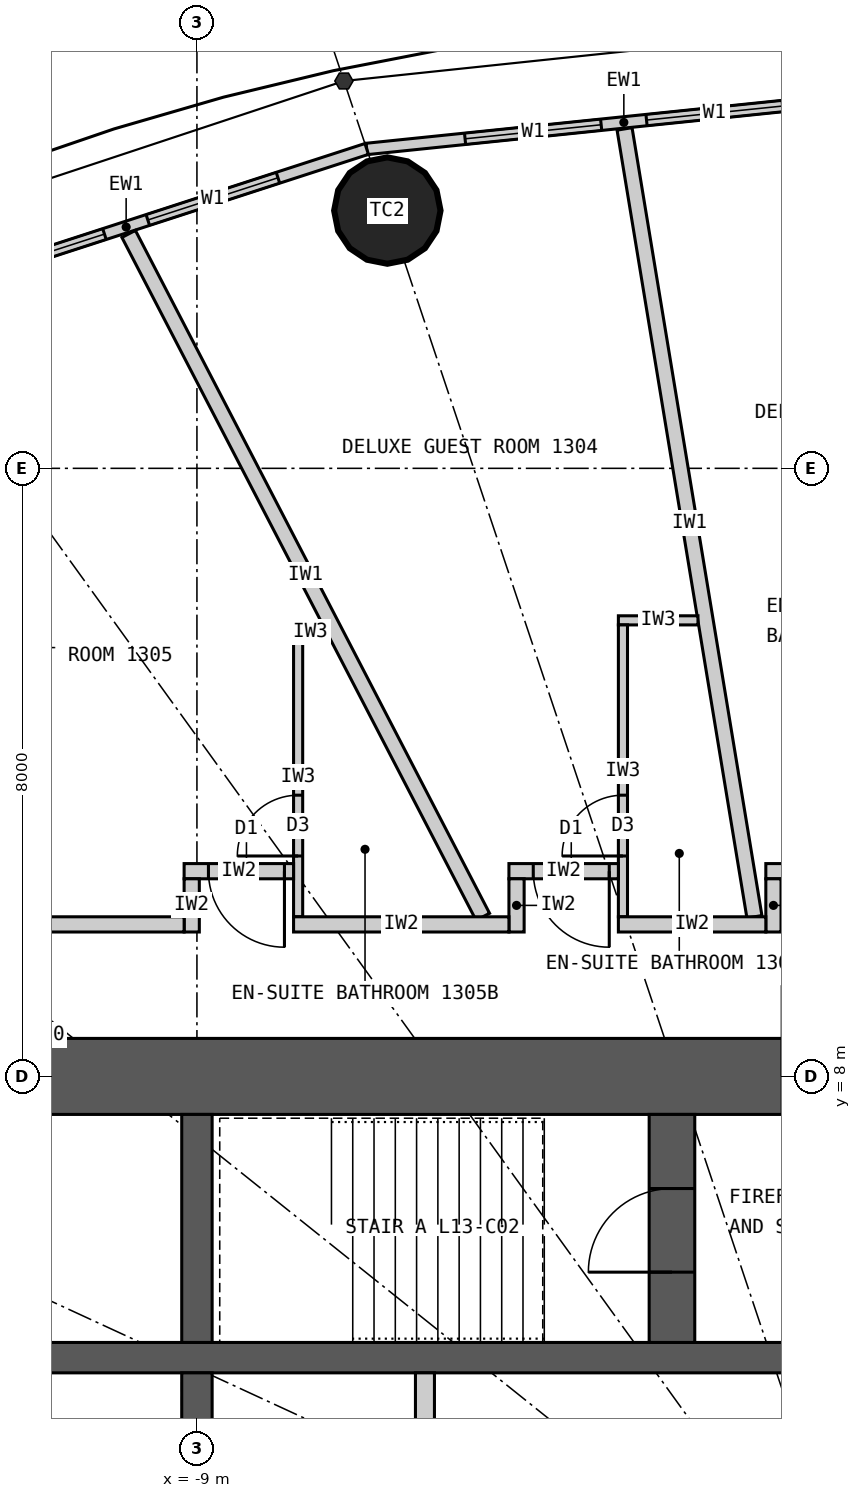
"""IFC4 building model, lengths in metres.
Left out: names, types, materials, properties, quantities, classifications, styles, units other than length and angle.
Written with IfcOpenShell. Run it as: python <this file> out.ifc"""

import sys

from ifc_helpers import new_model, si_unit, direction, frame, frame_2d, origin, origin_2d, place, context, subcontext, project, spatial, rectangle, circle, extrude, element, fill, save


model = new_model("IFC4")
c1 = context("Model", 3, precision=1e-05, world=origin(), true_north=direction((0.0, 1.0)))
c2 = subcontext(c1, "Body", "Model", "MODEL_VIEW")
j1 = project(units=[si_unit("LENGTHUNIT", "METRE"), si_unit("PLANEANGLEUNIT", "RADIAN")], contexts=[c1])
p1 = place(None, origin())
s1 = spatial("IfcSite", under=j1, at=p1, CompositionType="ELEMENT")
p2 = place(p1, origin())
s2 = spatial("IfcBuilding", under=s1, at=p2, CompositionType="ELEMENT")
p3 = place(p2, frame((0.0, 0.0, 57.3)))
s3 = spatial("IfcBuildingStorey", under=s2, at=p3, CompositionType="ELEMENT", Elevation=57.3)
p4 = place(p3, frame((-6.495, 19.391, 0.0), z_axis=(0.0, 0.0, 1.0), x_axis=(1.0, 0.0, 0.0)))
e1 = element("IfcColumn", 1, at=p4, inside=s3, PredefinedType="COLUMN", context=c2, shape_type="SweptSolid", body=[
    extrude(circle(Radius=0.7, at=origin_2d()), origin(), (0.0, 0.0, 1.0), 3.3),
])
p5 = place(p3, frame((-12.5, 8.0, 0.0), z_axis=(0.0, 0.0, 1.0), x_axis=(1.0, 0.0, 0.0)))
e2 = element("IfcWall", 2, at=p5, inside=s3, PredefinedType="SHEAR", context=c2, shape_type="SweptSolid", body=[
    extrude(rectangle(XDim=25.0, YDim=1.0, at=frame_2d((12.5, 0.0))), origin(), (0.0, 0.0, 1.0), 3.3),
])
p6 = place(p5, frame((11.2, 0.0, 0.0)))
e3 = element("IfcOpeningElement", 3, at=p6, cuts=e2, PredefinedType="OPENING", context=c2, shape_type="SweptSolid", body=[
    extrude(rectangle(XDim=1.2, YDim=2.2, at=frame_2d((0.6, 1.1))), frame((0.0, 0.51, 0.0), z_axis=(0.0, -1.0, 0.0), x_axis=(1.0, 0.0, 0.0)), (0.0, 0.0, 1.0), 1.02),
])
p7 = place(p5, frame((18.8, 0.0, 0.0)))
e4 = element("IfcOpeningElement", 4, at=p7, cuts=e2, PredefinedType="OPENING", context=c2, shape_type="SweptSolid", body=[
    extrude(rectangle(XDim=0.9, YDim=2.2, at=frame_2d((0.45, 1.1))), frame((0.0, 0.51, 0.0), z_axis=(0.0, -1.0, 0.0), x_axis=(1.0, 0.0, 0.0)), (0.0, 0.0, 1.0), 1.02),
])
p8 = place(p3, frame((-11.5, 4.3, 0.0), z_axis=(0.0, 0.0, 1.0), x_axis=(1.0, 0.0, 0.0)))
e5 = element("IfcWall", 5, at=p8, inside=s3, PredefinedType="SHEAR", context=c2, shape_type="SweptSolid", body=[
    extrude(rectangle(XDim=23.0, YDim=0.4, at=frame_2d((11.5, 0.0))), origin(), (0.0, 0.0, 1.0), 3.3),
])
p9 = place(p3, frame((-9.0, 4.5, 0.0), z_axis=(0.0, 0.0, 1.0), x_axis=(0.0, 1.0, 0.0)))
e6 = element("IfcWall", 6, at=p9, inside=s3, PredefinedType="SHEAR", context=c2, shape_type="SweptSolid", body=[
    extrude(rectangle(XDim=3.0, YDim=0.4, at=frame_2d((1.5, 0.0))), origin(), (0.0, 0.0, 1.0), 3.3),
])
p10 = place(p3, frame((-9.0, 1.75, 0.0), z_axis=(0.0, 0.0, 1.0), x_axis=(0.0, 1.0, 0.0)))
e7 = element("IfcWall", 7, at=p10, inside=s3, PredefinedType="SHEAR", context=c2, shape_type="SweptSolid", body=[
    extrude(rectangle(XDim=2.35, YDim=0.4, at=frame_2d((1.175, 0.0))), origin(), (0.0, 0.0, 1.0), 3.3),
])
p11 = place(p3, frame((-2.75, 4.5, 0.0), z_axis=(0.0, 0.0, 1.0), x_axis=(0.0, 1.0, 0.0)))
e8 = element("IfcWall", 8, at=p11, inside=s3, PredefinedType="SHEAR", context=c2, shape_type="SweptSolid", body=[
    extrude(rectangle(XDim=3.0, YDim=0.6, at=frame_2d((1.5, 0.0))), origin(), (0.0, 0.0, 1.0), 3.3),
])
p12 = place(p11, frame((0.925, 0.0, 0.0)))
e9 = element("IfcOpeningElement", 9, at=p12, cuts=e8, PredefinedType="OPENING", context=c2, shape_type="SweptSolid", body=[
    extrude(rectangle(XDim=1.1, YDim=2.2, at=frame_2d((0.55, 1.1))), frame((0.0, 0.31, 0.0), z_axis=(0.0, -1.0, 0.0), x_axis=(1.0, 0.0, 0.0)), (0.0, 0.0, 1.0), 0.62),
])
p13 = place(p3, frame((-6.0, 1.75, 0.0), z_axis=(0.0, 0.0, 1.0), x_axis=(0.0, 1.0, 0.0)))
e10 = element("IfcWall", 10, at=p13, inside=s3, PredefinedType="PARTITIONING", context=c2, shape_type="SweptSolid", body=[
    extrude(rectangle(XDim=2.35, YDim=0.25, at=frame_2d((1.175, 0.0))), origin(), (0.0, 0.0, 1.0), 3.3),
])
p14 = place(p3, frame((0.0, 20.9, 0.0), z_axis=(0.0, 0.0, 1.0), x_axis=(-0.994721394369, -0.102612609291, 0.0)))
e11 = element("IfcWall", 11, at=p14, inside=s3, PredefinedType="ELEMENTEDWALL", context=c2, shape_type="SweptSolid", body=[
    extrude(rectangle(XDim=6.802, YDim=0.15, at=frame_2d((3.401, 0.0))), origin(), (0.0, 0.0, 1.0), 3.12),
])
p15 = place(p14, frame((1.301, 0.0, 0.9)))
e12 = element("IfcOpeningElement", 12, at=p15, cuts=e11, PredefinedType="OPENING", context=c2, shape_type="SweptSolid", body=[
    extrude(rectangle(XDim=1.8, YDim=1.9, at=frame_2d((0.9, 0.95))), frame((0.0, 0.085, 0.0), z_axis=(0.0, -1.0, 0.0), x_axis=(1.0, 0.0, 0.0)), (0.0, 0.0, 1.0), 0.17),
])
p16 = place(p14, frame((3.701, 0.0, 0.9)))
e13 = element("IfcOpeningElement", 13, at=p16, cuts=e11, PredefinedType="OPENING", context=c2, shape_type="SweptSolid", body=[
    extrude(rectangle(XDim=1.8, YDim=1.9, at=frame_2d((0.9, 0.95))), frame((0.0, 0.085, 0.0), z_axis=(0.0, -1.0, 0.0), x_axis=(1.0, 0.0, 0.0)), (0.0, 0.0, 1.0), 0.17),
])
p17 = place(p3, frame((-6.766, 20.202, 0.0), z_axis=(0.0, 0.0, 1.0), x_axis=(-0.951137534625, -0.308767534285, 0.0)))
e14 = element("IfcWall", 14, at=p17, inside=s3, PredefinedType="ELEMENTEDWALL", context=c2, shape_type="SweptSolid", body=[
    extrude(rectangle(XDim=6.655, YDim=0.15, at=frame_2d((3.328, 0.0))), origin(), (0.0, 0.0, 1.0), 3.12),
])
p18 = place(p17, frame((1.228, 0.0, 0.9)))
e15 = element("IfcOpeningElement", 15, at=p18, cuts=e14, PredefinedType="OPENING", context=c2, shape_type="SweptSolid", body=[
    extrude(rectangle(XDim=1.8, YDim=1.9, at=frame_2d((0.9, 0.95))), frame((0.0, 0.085, 0.0), z_axis=(0.0, -1.0, 0.0), x_axis=(1.0, 0.0, 0.0)), (0.0, 0.0, 1.0), 0.17),
])
p19 = place(p17, frame((3.628, 0.0, 0.9)))
e16 = element("IfcOpeningElement", 16, at=p19, cuts=e14, PredefinedType="OPENING", context=c2, shape_type="SweptSolid", body=[
    extrude(rectangle(XDim=1.8, YDim=1.9, at=frame_2d((0.9, 0.95))), frame((0.0, 0.085, 0.0), z_axis=(0.0, -1.0, 0.0), x_axis=(1.0, 0.0, 0.0)), (0.0, 0.0, 1.0), 0.17),
])
p20 = place(p3, frame((-1.665, 10.1, 0.0), z_axis=(0.0, 0.0, 1.0), x_axis=(-0.162657606458, 0.986682574621, 0.0)))
e17 = element("IfcWall", 17, at=p20, inside=s3, PredefinedType="PARTITIONING", context=c2, shape_type="SweptSolid", body=[
    extrude(rectangle(XDim=10.505, YDim=0.2, at=frame_2d((5.252, 0.0))), origin(), (0.0, 0.0, 1.0), 3.12),
])
p21 = place(p3, frame((-5.239, 10.1, 0.0), z_axis=(0.0, 0.0, 1.0), x_axis=(-0.460422783389, 0.887699758103, 0.0)))
e18 = element("IfcWall", 18, at=p21, inside=s3, PredefinedType="PARTITIONING", context=c2, shape_type="SweptSolid", body=[
    extrude(rectangle(XDim=10.12, YDim=0.2, at=frame_2d((5.06, 0.0))), origin(), (0.0, 0.0, 1.0), 3.12),
])
p22 = place(p3, frame((-2.408, 14.0, 0.0), z_axis=(0.0, 0.0, 1.0), x_axis=(-1.0, 0.0, 0.0)))
e19 = element("IfcWall", 19, at=p22, inside=s3, PredefinedType="PARTITIONING", context=c2, shape_type="SweptSolid", body=[
    extrude(rectangle(XDim=1.047, YDim=0.12, at=frame_2d((0.523, 0.0))), origin(), (0.0, 0.0, 1.0), 3.12),
])
p23 = place(p3, frame((-3.395, 10.1, 0.0), z_axis=(0.0, 0.0, 1.0), x_axis=(0.0, 1.0, 0.0)))
e20 = element("IfcWall", 20, at=p23, inside=s3, PredefinedType="PARTITIONING", context=c2, shape_type="SweptSolid", body=[
    extrude(rectangle(XDim=3.84, YDim=0.12, at=frame_2d((1.92, 0.0))), origin(), (0.0, 0.0, 1.0), 3.12),
])
p24 = place(p23, frame((0.8, 0.0, 0.0)))
e21 = element("IfcOpeningElement", 21, at=p24, cuts=e20, PredefinedType="OPENING", context=c2, shape_type="SweptSolid", body=[
    extrude(rectangle(XDim=0.8, YDim=2.1, at=frame_2d((0.4, 1.05))), frame((0.0, 0.07, 0.0), z_axis=(0.0, -1.0, 0.0), x_axis=(1.0, 0.0, 0.0)), (0.0, 0.0, 1.0), 0.14),
])
p25 = place(p3, frame((-7.284, 13.85, 0.0), z_axis=(0.0, 0.0, 1.0), x_axis=(-1.0, 0.0, 0.0)))
e22 = element("IfcWall", 22, at=p25, inside=s3, PredefinedType="PARTITIONING", context=c2, shape_type="SweptSolid", body=[
    extrude(rectangle(XDim=0.445, YDim=0.12, at=frame_2d((0.222, 0.0))), origin(), (0.0, 0.0, 1.0), 3.12),
])
p26 = place(p3, frame((-7.669, 10.1, 0.0), z_axis=(0.0, 0.0, 1.0), x_axis=(0.0, 1.0, 0.0)))
e23 = element("IfcWall", 23, at=p26, inside=s3, PredefinedType="PARTITIONING", context=c2, shape_type="SweptSolid", body=[
    extrude(rectangle(XDim=3.69, YDim=0.12, at=frame_2d((1.845, 0.0))), origin(), (0.0, 0.0, 1.0), 3.12),
])
p27 = place(p26, frame((0.8, 0.0, 0.0)))
e24 = element("IfcOpeningElement", 24, at=p27, cuts=e23, PredefinedType="OPENING", context=c2, shape_type="SweptSolid", body=[
    extrude(rectangle(XDim=0.8, YDim=2.1, at=frame_2d((0.4, 1.05))), frame((0.0, 0.07, 0.0), z_axis=(0.0, -1.0, 0.0), x_axis=(1.0, 0.0, 0.0)), (0.0, 0.0, 1.0), 0.14),
])
p28 = place(p3, frame((-1.515, 10.7, 0.0), z_axis=(0.0, 0.0, 1.0), x_axis=(1.0, 0.0, 0.0)))
e25 = element("IfcWall", 25, at=p28, inside=s3, PredefinedType="PARTITIONING", context=c2, shape_type="SweptSolid", body=[
    extrude(rectangle(XDim=1.44, YDim=0.2, at=frame_2d((0.72, 0.0))), origin(), (0.0, 0.0, 1.0), 3.12),
])
p29 = place(p28, frame((0.32, 0.0, 0.0)))
e26 = element("IfcOpeningElement", 26, at=p29, cuts=e25, PredefinedType="OPENING", context=c2, shape_type="SweptSolid", body=[
    extrude(rectangle(XDim=1.0, YDim=2.2, at=frame_2d((0.5, 1.1))), frame((0.0, 0.11, 0.0), z_axis=(0.0, -1.0, 0.0), x_axis=(1.0, 0.0, 0.0)), (0.0, 0.0, 1.0), 0.22),
])
p30 = place(p3, frame((-1.415, 9.9, 0.0), z_axis=(0.0, 0.0, 1.0), x_axis=(0.0, 1.0, 0.0)))
e27 = element("IfcWall", 27, at=p30, inside=s3, PredefinedType="PARTITIONING", context=c2, shape_type="SweptSolid", body=[
    extrude(rectangle(XDim=0.7, YDim=0.2, at=frame_2d((0.35, 0.0))), origin(), (0.0, 0.0, 1.0), 3.12),
])
p31 = place(p3, frame((-4.895, 10.7, 0.0), z_axis=(0.0, 0.0, 1.0), x_axis=(1.0, 0.0, 0.0)))
e28 = element("IfcWall", 28, at=p31, inside=s3, PredefinedType="PARTITIONING", context=c2, shape_type="SweptSolid", body=[
    extrude(rectangle(XDim=1.44, YDim=0.2, at=frame_2d((0.72, 0.0))), origin(), (0.0, 0.0, 1.0), 3.12),
])
p32 = place(p31, frame((0.32, 0.0, 0.0)))
e29 = element("IfcOpeningElement", 29, at=p32, cuts=e28, PredefinedType="OPENING", context=c2, shape_type="SweptSolid", body=[
    extrude(rectangle(XDim=1.0, YDim=2.2, at=frame_2d((0.5, 1.1))), frame((0.0, 0.11, 0.0), z_axis=(0.0, -1.0, 0.0), x_axis=(1.0, 0.0, 0.0)), (0.0, 0.0, 1.0), 0.22),
])
p33 = place(p3, frame((-4.795, 9.9, 0.0), z_axis=(0.0, 0.0, 1.0), x_axis=(0.0, 1.0, 0.0)))
e30 = element("IfcWall", 30, at=p33, inside=s3, PredefinedType="PARTITIONING", context=c2, shape_type="SweptSolid", body=[
    extrude(rectangle(XDim=0.7, YDim=0.2, at=frame_2d((0.35, 0.0))), origin(), (0.0, 0.0, 1.0), 3.12),
])
p34 = place(p3, frame((-9.169, 10.7, 0.0), z_axis=(0.0, 0.0, 1.0), x_axis=(1.0, 0.0, 0.0)))
e31 = element("IfcWall", 31, at=p34, inside=s3, PredefinedType="PARTITIONING", context=c2, shape_type="SweptSolid", body=[
    extrude(rectangle(XDim=1.44, YDim=0.2, at=frame_2d((0.72, 0.0))), origin(), (0.0, 0.0, 1.0), 3.12),
])
p35 = place(p34, frame((0.32, 0.0, 0.0)))
e32 = element("IfcOpeningElement", 32, at=p35, cuts=e31, PredefinedType="OPENING", context=c2, shape_type="SweptSolid", body=[
    extrude(rectangle(XDim=1.0, YDim=2.2, at=frame_2d((0.5, 1.1))), frame((0.0, 0.11, 0.0), z_axis=(0.0, -1.0, 0.0), x_axis=(1.0, 0.0, 0.0)), (0.0, 0.0, 1.0), 0.22),
])
p36 = place(p3, frame((-9.069, 9.9, 0.0), z_axis=(0.0, 0.0, 1.0), x_axis=(0.0, 1.0, 0.0)))
e33 = element("IfcWall", 33, at=p36, inside=s3, PredefinedType="PARTITIONING", context=c2, shape_type="SweptSolid", body=[
    extrude(rectangle(XDim=0.7, YDim=0.2, at=frame_2d((0.35, 0.0))), origin(), (0.0, 0.0, 1.0), 3.12),
])
p37 = place(p3, frame((-14.1, 10.0, 0.0), z_axis=(0.0, 0.0, 1.0), x_axis=(1.0, 0.0, 0.0)))
e34 = element("IfcWall", 34, at=p37, inside=s3, PredefinedType="PARTITIONING", context=c2, shape_type="SweptSolid", body=[
    extrude(rectangle(XDim=4.931, YDim=0.2, at=frame_2d((2.466, 0.0))), origin(), (0.0, 0.0, 1.0), 3.12),
])
p38 = place(p3, frame((-7.729, 10.0, 0.0), z_axis=(0.0, 0.0, 1.0), x_axis=(1.0, 0.0, 0.0)))
e35 = element("IfcWall", 35, at=p38, inside=s3, PredefinedType="PARTITIONING", context=c2, shape_type="SweptSolid", body=[
    extrude(rectangle(XDim=2.833, YDim=0.2, at=frame_2d((1.417, 0.0))), origin(), (0.0, 0.0, 1.0), 3.12),
])
p39 = place(p3, frame((-3.455, 10.0, 0.0), z_axis=(0.0, 0.0, 1.0), x_axis=(1.0, 0.0, 0.0)))
e36 = element("IfcWall", 36, at=p39, inside=s3, PredefinedType="PARTITIONING", context=c2, shape_type="SweptSolid", body=[
    extrude(rectangle(XDim=1.94, YDim=0.2, at=frame_2d((0.97, 0.0))), origin(), (0.0, 0.0, 1.0), 3.12),
])
p40 = place(p15, origin())
e37 = element("IfcWindow", 37, at=p40, inside=s3, PartitioningType="SINGLE_PANEL", PredefinedType="WINDOW", context=c2, shape_type="SweptSolid", body=[
    extrude(rectangle(XDim=1.8, YDim=1.9, at=frame_2d((0.9, 0.95))), frame((0.0, 0.03, 0.0), z_axis=(0.0, -1.0, 0.0), x_axis=(1.0, 0.0, 0.0)), (0.0, 0.0, 1.0), 0.06),
])
fill(e12, e37)
p41 = place(p16, origin())
e38 = element("IfcWindow", 38, at=p41, inside=s3, PartitioningType="SINGLE_PANEL", PredefinedType="WINDOW", context=c2, shape_type="SweptSolid", body=[
    extrude(rectangle(XDim=1.8, YDim=1.9, at=frame_2d((0.9, 0.95))), frame((0.0, 0.03, 0.0), z_axis=(0.0, -1.0, 0.0), x_axis=(1.0, 0.0, 0.0)), (0.0, 0.0, 1.0), 0.06),
])
fill(e13, e38)
p42 = place(p18, origin())
e39 = element("IfcWindow", 39, at=p42, inside=s3, PartitioningType="SINGLE_PANEL", PredefinedType="WINDOW", context=c2, shape_type="SweptSolid", body=[
    extrude(rectangle(XDim=1.8, YDim=1.9, at=frame_2d((0.9, 0.95))), frame((0.0, 0.03, 0.0), z_axis=(0.0, -1.0, 0.0), x_axis=(1.0, 0.0, 0.0)), (0.0, 0.0, 1.0), 0.06),
])
fill(e15, e39)
p43 = place(p19, origin())
e40 = element("IfcWindow", 40, at=p43, inside=s3, PartitioningType="SINGLE_PANEL", PredefinedType="WINDOW", context=c2, shape_type="SweptSolid", body=[
    extrude(rectangle(XDim=1.8, YDim=1.9, at=frame_2d((0.9, 0.95))), frame((0.0, 0.03, 0.0), z_axis=(0.0, -1.0, 0.0), x_axis=(1.0, 0.0, 0.0)), (0.0, 0.0, 1.0), 0.06),
])
fill(e16, e40)
p44 = place(p24, origin())
e41 = element("IfcDoor", 41, at=p44, inside=s3, OperationType="SINGLE_SWING_LEFT", PredefinedType="DOOR", context=c2, shape_type="SweptSolid", body=[
    extrude(rectangle(XDim=0.8, YDim=2.1, at=frame_2d((0.4, 1.05))), frame((0.0, 0.025, 0.0), z_axis=(0.0, -1.0, 0.0), x_axis=(1.0, 0.0, 0.0)), (0.0, 0.0, 1.0), 0.05),
])
fill(e21, e41)
p45 = place(p32, origin())
e42 = element("IfcDoor", 42, at=p45, inside=s3, OperationType="SINGLE_SWING_RIGHT", PredefinedType="DOOR", context=c2, shape_type="SweptSolid", body=[
    extrude(rectangle(XDim=1.0, YDim=2.2, at=frame_2d((0.5, 1.1))), frame((0.0, 0.025, 0.0), z_axis=(0.0, -1.0, 0.0), x_axis=(1.0, 0.0, 0.0)), (0.0, 0.0, 1.0), 0.05),
])
fill(e29, e42)
p46 = place(p27, origin())
e43 = element("IfcDoor", 43, at=p46, inside=s3, OperationType="SINGLE_SWING_LEFT", PredefinedType="DOOR", context=c2, shape_type="SweptSolid", body=[
    extrude(rectangle(XDim=0.8, YDim=2.1, at=frame_2d((0.4, 1.05))), frame((0.0, 0.025, 0.0), z_axis=(0.0, -1.0, 0.0), x_axis=(1.0, 0.0, 0.0)), (0.0, 0.0, 1.0), 0.05),
])
fill(e24, e43)
p47 = place(p35, origin())
e44 = element("IfcDoor", 44, at=p47, inside=s3, OperationType="SINGLE_SWING_RIGHT", PredefinedType="DOOR", context=c2, shape_type="SweptSolid", body=[
    extrude(rectangle(XDim=1.0, YDim=2.2, at=frame_2d((0.5, 1.1))), frame((0.0, 0.025, 0.0), z_axis=(0.0, -1.0, 0.0), x_axis=(1.0, 0.0, 0.0)), (0.0, 0.0, 1.0), 0.05),
])
fill(e32, e44)
p48 = place(p12, origin())
e45 = element("IfcDoor", 45, at=p48, inside=s3, OperationType="SINGLE_SWING_LEFT", PredefinedType="DOOR", context=c2, shape_type="SweptSolid", body=[
    extrude(rectangle(XDim=1.1, YDim=2.2, at=frame_2d((0.55, 1.1))), frame((0.0, 0.025, 0.0), z_axis=(0.0, -1.0, 0.0), x_axis=(1.0, 0.0, 0.0)), (0.0, 0.0, 1.0), 0.05),
])
fill(e9, e45)
save(model, sys.argv[1])
